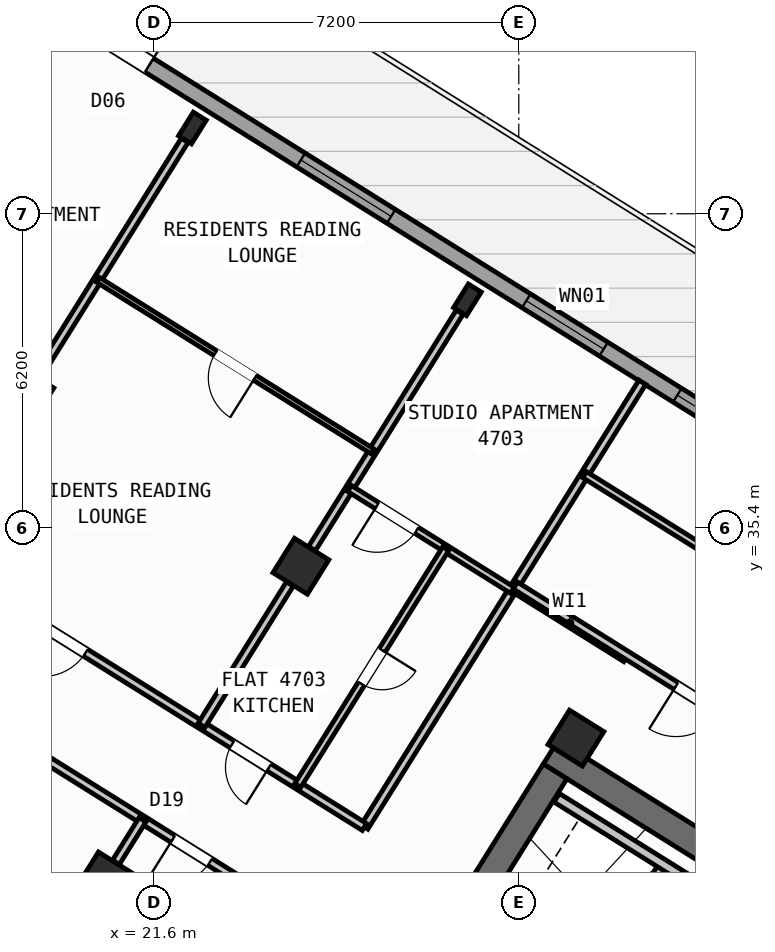
"""IFC4 building model, lengths in metres.
Left out: names, types, materials, properties, quantities, classifications, styles, units other than length and angle.
Written with IfcOpenShell. Run it as: python <this file> out.ifc"""

import sys

from ifc_helpers import new_model, si_unit, direction, frame, frame_2d, origin, origin_2d, place, context, subcontext, project, spatial, rectangle, hollow_rectangle, i_section, extrude, source, transform, mapped, element, fill, save


model = new_model("IFC4")
c1 = context("Model", 3, precision=1e-05, world=origin(), true_north=direction((0.0, 1.0)))
c2 = subcontext(c1, "Body", "Model", "MODEL_VIEW")
j1 = project(units=[si_unit("LENGTHUNIT", "METRE"), si_unit("PLANEANGLEUNIT", "RADIAN")], contexts=[c1])
p1 = place(None, origin())
s1 = spatial("IfcSite", under=j1, at=p1, CompositionType="ELEMENT")
p2 = place(p1, origin())
s2 = spatial("IfcBuilding", under=s1, at=p2, CompositionType="ELEMENT")
p3 = place(p2, frame((0.0, 0.0, 187.8)))
s3 = spatial("IfcBuildingStorey", under=s2, at=p3, CompositionType="ELEMENT", Elevation=187.8)
p4 = place(p3, frame((40.573, 24.01, 0.0), z_axis=(0.0, 0.0, 1.0), x_axis=(-0.848047359947, 0.529920442413, 0.0)))
e1 = element("IfcWall", 1, at=p4, inside=s3, PredefinedType="SHEAR", context=c2, shape_type="SweptSolid", body=[
    extrude(rectangle(XDim=13.14, YDim=0.55, at=frame_2d((6.57, 0.0))), origin(), (0.0, 0.0, 1.0), 3.35),
])
p5 = place(p3, frame((29.517, 30.594, 0.0), z_axis=(0.0, 0.0, 1.0), x_axis=(-0.529906864564, -0.848055844204, 0.0)))
e2 = element("IfcWall", 2, at=p5, inside=s3, PredefinedType="SHEAR", context=c2, shape_type="SweptSolid", body=[
    extrude(rectangle(XDim=3.575, YDim=0.55, at=frame_2d((1.788, 0.0))), origin(), (0.0, 0.0, 1.0), 3.35),
])
m1 = source(origin(), c2, "Body", "SweptSolid", [
    extrude(hollow_rectangle(XDim=0.8, YDim=0.8, WallThickness=0.032, at=origin_2d()), origin(), (0.0, 0.0, 1.0), 3.6),
])
p6 = place(p3, frame((29.928, 31.251, 0.0), z_axis=(0.0, 0.0, 1.0), x_axis=(-0.848048096156, 0.529919264233, 0.0)))
e3 = element("IfcColumn", 3, at=p6, inside=s3, PredefinedType="COLUMN", context=c2, shape_type="MappedRepresentation", body=[
    mapped(m1, transform((0.0, 0.0, 0.0), scale=1.0)),
])
m2 = source(origin(), c2, "Body", "SweptSolid", [
    extrude(i_section(OverallWidth=0.3, OverallDepth=0.55, WebThickness=0.015, FlangeThickness=0.029, at=origin_2d()), origin(), (0.0, 0.0, 1.0), 3.6),
])
p7 = place(p3, frame((27.786, 39.901, 0.0), z_axis=(0.0, 0.0, 1.0), x_axis=(-0.848048096156, 0.529919264233, 0.0)))
e4 = element("IfcColumn", 4, at=p7, inside=s3, PredefinedType="COLUMN", context=c2, shape_type="MappedRepresentation", body=[
    mapped(m2, transform((0.0, 0.0, 0.0), scale=1.0)),
])
for number, where, z_axis, x_axis in (
    (5, (24.5, 34.643, 0.0), (0.0, 0.0, 1.0), (-0.848, 0.53, 0.0)),
    (6, (20.632, 28.452, 0.0), (0.0, 0.0, 1.0), (-0.848, 0.53, 0.0)),
):
    element("IfcColumn", number, at=place(p3, frame(where, z_axis=z_axis, x_axis=x_axis)), inside=s3, PredefinedType="COLUMN", context=c2, shape_type="MappedRepresentation", body=[
        mapped(m1, transform((0.0, 0.0, 0.0), scale=1.0)),
    ])
p8 = place(p3, frame((22.358, 43.292, 0.0), z_axis=(0.0, 0.0, 1.0), x_axis=(-0.848048096156, 0.529919264233, 0.0)))
e7 = element("IfcColumn", 7, at=p8, inside=s3, PredefinedType="COLUMN", context=c2, shape_type="MappedRepresentation", body=[
    mapped(m2, transform((0.0, 0.0, 0.0), scale=1.0)),
])
p9 = place(p3, frame((19.073, 38.034, 0.0), z_axis=(0.0, 0.0, 1.0), x_axis=(-0.848048096156, 0.529919264233, 0.0)))
e8 = element("IfcColumn", 8, at=p9, inside=s3, PredefinedType="COLUMN", context=c2, shape_type="MappedRepresentation", body=[
    mapped(m1, transform((0.0, 0.0, 0.0), scale=1.0)),
])
p10 = place(p3, frame((17.424, 47.083, 0.0), z_axis=(0.0, 0.0, 1.0), x_axis=(0.848049927979, -0.529916332693, 0.0)))
e9 = element("IfcWall", 9, at=p10, inside=s3, PredefinedType="STANDARD", context=c2, shape_type="SweptSolid", body=[
    extrude(rectangle(XDim=29.223, YDim=0.32, at=frame_2d((14.612, 0.0))), origin(), (0.0, 0.0, 1.0), 3.35),
])
p11 = place(p10, frame((3.764, 0.0, 0.0)))
e10 = element("IfcOpeningElement", 10, at=p11, cuts=e9, PredefinedType="OPENING", context=c2, shape_type="SweptSolid", body=[
    extrude(rectangle(XDim=1.05, YDim=2.15, at=frame_2d((0.525, 1.075))), frame((0.0, 0.17, 0.0), z_axis=(0.0, -1.0, 0.0), x_axis=(1.0, 0.0, 0.0)), (0.0, 0.0, 1.0), 0.34),
])
p12 = place(p10, frame((8.344, 0.0, 0.8)))
e11 = element("IfcOpeningElement", 11, at=p12, cuts=e9, PredefinedType="OPENING", context=c2, shape_type="SweptSolid", body=[
    extrude(rectangle(XDim=2.1, YDim=1.55, at=frame_2d((1.05, 0.775))), frame((0.0, 0.17, 0.0), z_axis=(0.0, -1.0, 0.0), x_axis=(1.0, 0.0, 0.0)), (0.0, 0.0, 1.0), 0.34),
])
p13 = place(p10, frame((13.589, 0.0, 0.85)))
e12 = element("IfcOpeningElement", 12, at=p13, cuts=e9, PredefinedType="OPENING", context=c2, shape_type="SweptSolid", body=[
    extrude(rectangle(XDim=1.8, YDim=1.5, at=frame_2d((0.9, 0.75))), frame((0.0, 0.17, 0.0), z_axis=(0.0, -1.0, 0.0), x_axis=(1.0, 0.0, 0.0)), (0.0, 0.0, 1.0), 0.34),
])
p14 = place(p10, frame((17.104, 0.0, 0.95)))
e13 = element("IfcOpeningElement", 13, at=p14, cuts=e9, PredefinedType="OPENING", context=c2, shape_type="SweptSolid", body=[
    extrude(rectangle(XDim=1.2, YDim=1.4, at=frame_2d((0.6, 0.7))), frame((0.0, 0.17, 0.0), z_axis=(0.0, -1.0, 0.0), x_axis=(1.0, 0.0, 0.0)), (0.0, 0.0, 1.0), 0.34),
])
p15 = place(p10, frame((21.214, 0.0, 0.95)))
e14 = element("IfcOpeningElement", 14, at=p15, cuts=e9, PredefinedType="OPENING", context=c2, shape_type="SweptSolid", body=[
    extrude(rectangle(XDim=1.2, YDim=1.4, at=frame_2d((0.6, 0.7))), frame((0.0, 0.17, 0.0), z_axis=(0.0, -1.0, 0.0), x_axis=(1.0, 0.0, 0.0)), (0.0, 0.0, 1.0), 0.34),
])
p16 = place(p10, frame((25.853, 0.0, 0.95)))
e15 = element("IfcOpeningElement", 15, at=p16, cuts=e9, PredefinedType="OPENING", context=c2, shape_type="SweptSolid", body=[
    extrude(rectangle(XDim=1.2, YDim=1.4, at=frame_2d((0.6, 0.7))), frame((0.0, 0.17, 0.0), z_axis=(0.0, -1.0, 0.0), x_axis=(1.0, 0.0, 0.0)), (0.0, 0.0, 1.0), 0.34),
])
p17 = place(p3, frame((31.645, 28.716, 0.0), z_axis=(0.0, 0.0, 1.0), x_axis=(-0.52986693015, -0.848080795876, 0.0)))
e16 = element("IfcWall", 16, at=p17, inside=s3, PredefinedType="STANDARD", context=c2, shape_type="SweptSolid", body=[
    extrude(rectangle(XDim=2.66, YDim=0.2, at=frame_2d((1.33, 0.0))), origin(), (0.0, 0.0, 1.0), 3.34),
])
p18 = place(p3, frame((33.363, 27.69, 0.0), z_axis=(0.0, 0.0, 1.0), x_axis=(-0.848047090064, 0.529920874315, 0.0)))
e17 = element("IfcWall", 17, at=p18, inside=s3, PredefinedType="STANDARD", context=c2, shape_type="SweptSolid", body=[
    extrude(rectangle(XDim=4.498, YDim=0.2, at=frame_2d((2.249, 0.0))), origin(), (0.0, 0.0, 1.0), 3.34),
])
p19 = place(p3, frame((30.914, 32.829, 0.0), z_axis=(0.0, 0.0, 1.0), x_axis=(-0.848008813643, 0.529982124211, 0.0)))
e18 = element("IfcWall", 18, at=p19, inside=s3, PredefinedType="PARTITIONING", context=c2, shape_type="SweptSolid", body=[
    extrude(rectangle(XDim=2.61, YDim=0.16, at=frame_2d((1.305, 0.0))), origin(), (0.0, 0.0, 1.0), 3.34),
])
p20 = place(p3, frame((31.239, 38.274, 0.0), z_axis=(0.0, 0.0, 1.0), x_axis=(-0.529914125013, -0.848051307476, 0.0)))
e19 = element("IfcWall", 19, at=p20, inside=s3, PredefinedType="PARTITIONING", context=c2, shape_type="SweptSolid", body=[
    extrude(rectangle(XDim=10.35, YDim=0.16, at=frame_2d((5.175, 0.0))), origin(), (0.0, 0.0, 1.0), 3.34),
])
p21 = place(p3, frame((25.754, 29.497, 0.0), z_axis=(0.0, 0.0, 1.0), x_axis=(-0.848045850158, 0.529922858565, 0.0)))
e20 = element("IfcWall", 20, at=p21, inside=s3, PredefinedType="PARTITIONING", context=c2, shape_type="SweptSolid", body=[
    extrude(rectangle(XDim=16.73, YDim=0.16, at=frame_2d((8.365, 0.0))), origin(), (0.0, 0.0, 1.0), 3.34),
])
p22 = place(p21, frame((2.22, 0.0, 0.0)))
e21 = element("IfcOpeningElement", 21, at=p22, cuts=e20, PredefinedType="OPENING", context=c2, shape_type="SweptSolid", body=[
    extrude(rectangle(XDim=0.86, YDim=2.05, at=frame_2d((0.43, 1.025))), frame((0.0, 0.09, 0.0), z_axis=(0.0, -1.0, 0.0), x_axis=(1.0, 0.0, 0.0)), (0.0, 0.0, 1.0), 0.18),
])
p23 = place(p21, frame((6.49, 0.0, 0.0)))
e22 = element("IfcOpeningElement", 22, at=p23, cuts=e20, PredefinedType="OPENING", context=c2, shape_type="SweptSolid", body=[
    extrude(rectangle(XDim=1.0, YDim=2.1, at=frame_2d((0.5, 1.05))), frame((0.0, 0.09, 0.0), z_axis=(0.0, -1.0, 0.0), x_axis=(1.0, 0.0, 0.0)), (0.0, 0.0, 1.0), 0.18),
])
p24 = place(p21, frame((14.304, 0.0, 0.0)))
e23 = element("IfcOpeningElement", 23, at=p24, cuts=e20, PredefinedType="OPENING", context=c2, shape_type="SweptSolid", body=[
    extrude(rectangle(XDim=1.0, YDim=2.1, at=frame_2d((0.5, 1.05))), frame((0.0, 0.09, 0.0), z_axis=(0.0, -1.0, 0.0), x_axis=(1.0, 0.0, 0.0)), (0.0, 0.0, 1.0), 0.18),
])
p25 = place(p3, frame((24.588, 27.631, 0.0), z_axis=(0.0, 0.0, 1.0), x_axis=(-0.848041752158, 0.529929416617, 0.0)))
e24 = element("IfcWall", 24, at=p25, inside=s3, PredefinedType="PARTITIONING", context=c2, shape_type="SweptSolid", body=[
    extrude(rectangle(XDim=16.73, YDim=0.16, at=frame_2d((8.365, 0.0))), origin(), (0.0, 0.0, 1.0), 3.34),
])
p26 = place(p25, frame((2.22, 0.0, 0.0)))
e25 = element("IfcOpeningElement", 25, at=p26, cuts=e24, PredefinedType="OPENING", context=c2, shape_type="SweptSolid", body=[
    extrude(rectangle(XDim=0.86, YDim=2.05, at=frame_2d((0.43, 1.025))), frame((0.0, 0.09, 0.0), z_axis=(0.0, -1.0, 0.0), x_axis=(1.0, 0.0, 0.0)), (0.0, 0.0, 1.0), 0.18),
])
p27 = place(p25, frame((7.82, 0.0, 0.0)))
e26 = element("IfcOpeningElement", 26, at=p27, cuts=e24, PredefinedType="OPENING", context=c2, shape_type="SweptSolid", body=[
    extrude(rectangle(XDim=1.0, YDim=2.1, at=frame_2d((0.5, 1.05))), frame((0.0, 0.09, 0.0), z_axis=(0.0, -1.0, 0.0), x_axis=(1.0, 0.0, 0.0)), (0.0, 0.0, 1.0), 0.18),
])
p28 = place(p25, frame((12.95, 0.0, 0.0)))
e27 = element("IfcOpeningElement", 27, at=p28, cuts=e24, PredefinedType="OPENING", context=c2, shape_type="SweptSolid", body=[
    extrude(rectangle(XDim=1.0, YDim=2.1, at=frame_2d((0.5, 1.05))), frame((0.0, 0.09, 0.0), z_axis=(0.0, -1.0, 0.0), x_axis=(1.0, 0.0, 0.0)), (0.0, 0.0, 1.0), 0.18),
])
p29 = place(p3, frame((21.374, 29.639, 0.0), z_axis=(0.0, 0.0, 1.0), x_axis=(-0.529998940003, -0.847998304005, 0.0)))
e28 = element("IfcWall", 28, at=p29, inside=s3, PredefinedType="PARTITIONING", context=c2, shape_type="SweptSolid", body=[
    extrude(rectangle(XDim=0.988, YDim=0.16, at=frame_2d((0.494, 0.0))), origin(), (0.0, 0.0, 1.0), 2.825),
])
p30 = place(p3, frame((27.634, 39.657, 0.0), z_axis=(0.0, 0.0, 1.0), x_axis=(-0.529899205623, -0.848060629837, 0.0)))
e29 = element("IfcWall", 29, at=p30, inside=s3, PredefinedType="PARTITIONING", context=c2, shape_type="SweptSolid", body=[
    extrude(rectangle(XDim=5.501, YDim=0.16, at=frame_2d((2.75, 0.0))), origin(), (0.0, 0.0, 1.0), 2.825),
])
p31 = place(p3, frame((24.282, 34.293, 0.0), z_axis=(0.0, 0.0, 1.0), x_axis=(-0.529938869374, -0.84803584519, 0.0)))
e30 = element("IfcWall", 30, at=p31, inside=s3, PredefinedType="PARTITIONING", context=c2, shape_type="SweptSolid", body=[
    extrude(rectangle(XDim=3.288, YDim=0.16, at=frame_2d((1.644, 0.0))), origin(), (0.0, 0.0, 1.0), 2.825),
])
p32 = place(p3, frame((28.674, 34.169, 0.0), z_axis=(0.0, 0.0, 1.0), x_axis=(-0.848059820872, 0.529900500304, 0.0)))
e31 = element("IfcWall", 31, at=p32, inside=s3, PredefinedType="PLUMBINGWALL", context=c2, shape_type="SweptSolid", body=[
    extrude(rectangle(XDim=3.79, YDim=0.14, at=frame_2d((1.895, 0.0))), origin(), (0.0, 0.0, 1.0), 3.34),
])
p33 = place(p32, frame((2.23, 0.0, 0.0)))
e32 = element("IfcOpeningElement", 32, at=p33, cuts=e31, PredefinedType="OPENING", context=c2, shape_type="SweptSolid", body=[
    extrude(rectangle(XDim=0.92, YDim=2.08, at=frame_2d((0.46, 1.04))), frame((0.0, 0.08, 0.0), z_axis=(0.0, -1.0, 0.0), x_axis=(1.0, 0.0, 0.0)), (0.0, 0.0, 1.0), 0.16),
])
p34 = place(p3, frame((27.359, 34.991, 0.0), z_axis=(0.0, 0.0, 1.0), x_axis=(-0.529907329021, -0.848055553988, 0.0)))
e33 = element("IfcWall", 33, at=p34, inside=s3, PredefinedType="PLUMBINGWALL", context=c2, shape_type="SweptSolid", body=[
    extrude(rectangle(XDim=5.51, YDim=0.14, at=frame_2d((2.755, 0.0))), origin(), (0.0, 0.0, 1.0), 2.995),
])
p35 = place(p34, frame((2.365, 0.0, 0.0)))
e34 = element("IfcOpeningElement", 34, at=p35, cuts=e33, PredefinedType="OPENING", context=c2, shape_type="SweptSolid", body=[
    extrude(rectangle(XDim=0.78, YDim=2.05, at=frame_2d((0.39, 1.025))), frame((0.0, 0.08, 0.0), z_axis=(0.0, -1.0, 0.0), x_axis=(1.0, 0.0, 0.0)), (0.0, 0.0, 1.0), 0.16),
])
p36 = place(p3, frame((22.206, 43.049, 0.0), z_axis=(0.0, 0.0, 1.0), x_axis=(-0.529919150083, -0.848048167486, 0.0)))
e35 = element("IfcWall", 35, at=p36, inside=s3, PredefinedType="PARTITIONING", context=c2, shape_type="SweptSolid", body=[
    extrude(rectangle(XDim=5.501, YDim=0.16, at=frame_2d((2.75, 0.0))), origin(), (0.0, 0.0, 1.0), 2.825),
])
p37 = place(p3, frame((25.916, 36.909, 0.0), z_axis=(0.0, 0.0, 1.0), x_axis=(-0.848056163074, 0.529906354247, 0.0)))
e36 = element("IfcWall", 36, at=p37, inside=s3, PredefinedType="PARTITIONING", context=c2, shape_type="SweptSolid", body=[
    extrude(rectangle(XDim=6.4, YDim=0.11, at=frame_2d((3.2, 0.0))), origin(), (0.0, 0.0, 1.0), 3.34),
])
p38 = place(p37, frame((2.74, 0.0, 0.0)))
e37 = element("IfcOpeningElement", 37, at=p38, cuts=e36, PredefinedType="OPENING", context=c2, shape_type="SweptSolid", body=[
    extrude(rectangle(XDim=0.92, YDim=2.08, at=frame_2d((0.46, 1.04))), frame((0.0, 0.065, 0.0), z_axis=(0.0, -1.0, 0.0), x_axis=(1.0, 0.0, 0.0)), (0.0, 0.0, 1.0), 0.13),
])
p39 = place(p3, frame((41.936, 26.012, 0.0), z_axis=(0.0, 0.0, 1.0), x_axis=(-0.848051154596, 0.529914369676, 0.0)))
e38 = element("IfcWall", 38, at=p39, inside=s3, PredefinedType="PARTITIONING", context=c2, shape_type="SweptSolid", body=[
    extrude(rectangle(XDim=15.57, YDim=0.16, at=frame_2d((7.785, 0.0))), origin(), (0.0, 0.0, 1.0), 3.34),
])
p40 = place(p39, frame((10.83, 0.0, 0.0)))
e39 = element("IfcOpeningElement", 39, at=p40, cuts=e38, PredefinedType="OPENING", context=c2, shape_type="SweptSolid", body=[
    extrude(rectangle(XDim=1.0, YDim=2.1, at=frame_2d((0.5, 1.05))), frame((0.0, 0.09, 0.0), z_axis=(0.0, -1.0, 0.0), x_axis=(1.0, 0.0, 0.0)), (0.0, 0.0, 1.0), 0.18),
])
p41 = place(p3, frame((42.226, 28.873, 0.0), z_axis=(0.0, 0.0, 1.0), x_axis=(-0.848049134363, 0.529917602752, 0.0)))
e40 = element("IfcWall", 40, at=p41, inside=s3, PredefinedType="PLUMBINGWALL", context=c2, shape_type="SweptSolid", body=[
    extrude(rectangle(XDim=14.3, YDim=0.14, at=frame_2d((7.15, 0.0))), origin(), (0.0, 0.0, 1.0), 3.34),
])
p42 = place(p41, frame((9.57, 0.0, 0.0)))
e41 = element("IfcOpeningElement", 41, at=p42, cuts=e40, PredefinedType="OPENING", context=c2, shape_type="SweptSolid", body=[
    extrude(rectangle(XDim=0.92, YDim=2.08, at=frame_2d((0.46, 1.04))), frame((0.0, 0.08, 0.0), z_axis=(0.0, -1.0, 0.0), x_axis=(1.0, 0.0, 0.0)), (0.0, 0.0, 1.0), 0.16),
])
m3 = source(origin(), c2, "Body", "SweptSolid", [
    extrude(rectangle(XDim=1.05, YDim=2.15, at=frame_2d((0.525, 1.075))), frame((0.0, 0.025, 0.0), z_axis=(0.0, -1.0, 0.0), x_axis=(1.0, 0.0, 0.0)), (0.0, 0.0, 1.0), 0.05),
])
p43 = place(p11, origin())
e42 = element("IfcDoor", 42, at=p43, inside=s3, OperationType="SINGLE_SWING_RIGHT", PredefinedType="DOOR", context=c2, shape_type="MappedRepresentation", body=[
    mapped(m3, transform((0.0, 0.0, 0.0), scale=1.0)),
])
fill(e10, e42)
m4 = source(origin(), c2, "Body", "SweptSolid", [
    extrude(rectangle(XDim=2.1, YDim=1.55, at=frame_2d((1.05, 0.775))), frame((0.0, 0.03, 0.0), z_axis=(0.0, -1.0, 0.0), x_axis=(1.0, 0.0, 0.0)), (0.0, 0.0, 1.0), 0.06),
])
p44 = place(p12, origin())
e43 = element("IfcWindow", 43, at=p44, inside=s3, PartitioningType="SINGLE_PANEL", PredefinedType="WINDOW", context=c2, shape_type="MappedRepresentation", body=[
    mapped(m4, transform((0.0, 0.0, 0.0), scale=1.0)),
])
fill(e11, e43)
m5 = source(origin(), c2, "Body", "SweptSolid", [
    extrude(rectangle(XDim=1.8, YDim=1.5, at=frame_2d((0.9, 0.75))), frame((0.0, 0.03, 0.0), z_axis=(0.0, -1.0, 0.0), x_axis=(1.0, 0.0, 0.0)), (0.0, 0.0, 1.0), 0.06),
])
p45 = place(p13, origin())
e44 = element("IfcWindow", 44, at=p45, inside=s3, PartitioningType="SINGLE_PANEL", PredefinedType="WINDOW", context=c2, shape_type="MappedRepresentation", body=[
    mapped(m5, transform((0.0, 0.0, 0.0), scale=1.0)),
])
fill(e12, e44)
m6 = source(origin(), c2, "Body", "SweptSolid", [
    extrude(rectangle(XDim=1.2, YDim=1.4, at=frame_2d((0.6, 0.7))), frame((0.0, 0.03, 0.0), z_axis=(0.0, -1.0, 0.0), x_axis=(1.0, 0.0, 0.0)), (0.0, 0.0, 1.0), 0.06),
])
p46 = place(p14, origin())
e45 = element("IfcWindow", 45, at=p46, inside=s3, PartitioningType="SINGLE_PANEL", PredefinedType="WINDOW", context=c2, shape_type="MappedRepresentation", body=[
    mapped(m6, transform((0.0, 0.0, 0.0), scale=1.0)),
])
fill(e13, e45)
m7 = source(origin(), c2, "Body", "SweptSolid", [
    extrude(rectangle(XDim=0.86, YDim=2.05, at=frame_2d((0.43, 1.025))), frame((0.0, 0.025, 0.0), z_axis=(0.0, -1.0, 0.0), x_axis=(1.0, 0.0, 0.0)), (0.0, 0.0, 1.0), 0.05),
])
p47 = place(p26, origin())
e46 = element("IfcDoor", 46, at=p47, inside=s3, OperationType="SINGLE_SWING_RIGHT", PredefinedType="DOOR", context=c2, shape_type="MappedRepresentation", body=[
    mapped(m7, transform((0.0, 0.0, 0.0), scale=1.0)),
])
fill(e25, e46)
p48 = place(p22, origin())
e47 = element("IfcDoor", 47, at=p48, inside=s3, OperationType="SINGLE_SWING_LEFT", PredefinedType="DOOR", context=c2, shape_type="MappedRepresentation", body=[
    mapped(m7, transform((0.0, 0.0, 0.0), scale=1.0)),
])
fill(e21, e47)
m8 = source(origin(), c2, "Body", "SweptSolid", [
    extrude(rectangle(XDim=0.92, YDim=2.08, at=frame_2d((0.46, 1.04))), frame((0.0, 0.025, 0.0), z_axis=(0.0, -1.0, 0.0), x_axis=(1.0, 0.0, 0.0)), (0.0, 0.0, 1.0), 0.05),
])
p49 = place(p33, origin())
e48 = element("IfcDoor", 48, at=p49, inside=s3, OperationType="SINGLE_SWING_RIGHT", PredefinedType="DOOR", context=c2, shape_type="MappedRepresentation", body=[
    mapped(m8, transform((0.0, 0.0, 0.0), scale=1.0)),
])
fill(e32, e48)
m9 = source(origin(), c2, "Body", "SweptSolid", [
    extrude(rectangle(XDim=0.78, YDim=2.05, at=frame_2d((0.39, 1.025))), frame((0.0, 0.025, 0.0), z_axis=(0.0, -1.0, 0.0), x_axis=(1.0, 0.0, 0.0)), (0.0, 0.0, 1.0), 0.05),
])
p50 = place(p35, origin())
e49 = element("IfcDoor", 49, at=p50, inside=s3, OperationType="SINGLE_SWING_LEFT", PredefinedType="DOOR", context=c2, shape_type="MappedRepresentation", body=[
    mapped(m9, transform((0.0, 0.0, 0.0), scale=1.0)),
])
fill(e34, e49)
m10 = source(origin(), c2, "Body", "SweptSolid", [
    extrude(rectangle(XDim=1.0, YDim=2.1, at=frame_2d((0.5, 1.05))), frame((0.0, 0.025, 0.0), z_axis=(0.0, -1.0, 0.0), x_axis=(1.0, 0.0, 0.0)), (0.0, 0.0, 1.0), 0.05),
])
p51 = place(p23, origin())
e50 = element("IfcDoor", 50, at=p51, inside=s3, OperationType="SINGLE_SWING_RIGHT", PredefinedType="DOOR", context=c2, shape_type="MappedRepresentation", body=[
    mapped(m10, transform((0.0, 0.0, 0.0), scale=1.0)),
])
fill(e22, e50)
p52 = place(p38, origin())
e51 = element("IfcDoor", 51, at=p52, inside=s3, OperationType="SINGLE_SWING_LEFT", PredefinedType="DOOR", context=c2, shape_type="MappedRepresentation", body=[
    mapped(m8, transform((0.0, 0.0, 0.0), scale=1.0)),
])
fill(e37, e51)
p53 = place(p40, origin())
e52 = element("IfcDoor", 52, at=p53, inside=s3, OperationType="SINGLE_SWING_RIGHT", PredefinedType="DOOR", context=c2, shape_type="MappedRepresentation", body=[
    mapped(m10, transform((0.0, 0.0, 0.0), scale=1.0)),
])
fill(e39, e52)
save(model, sys.argv[1])
